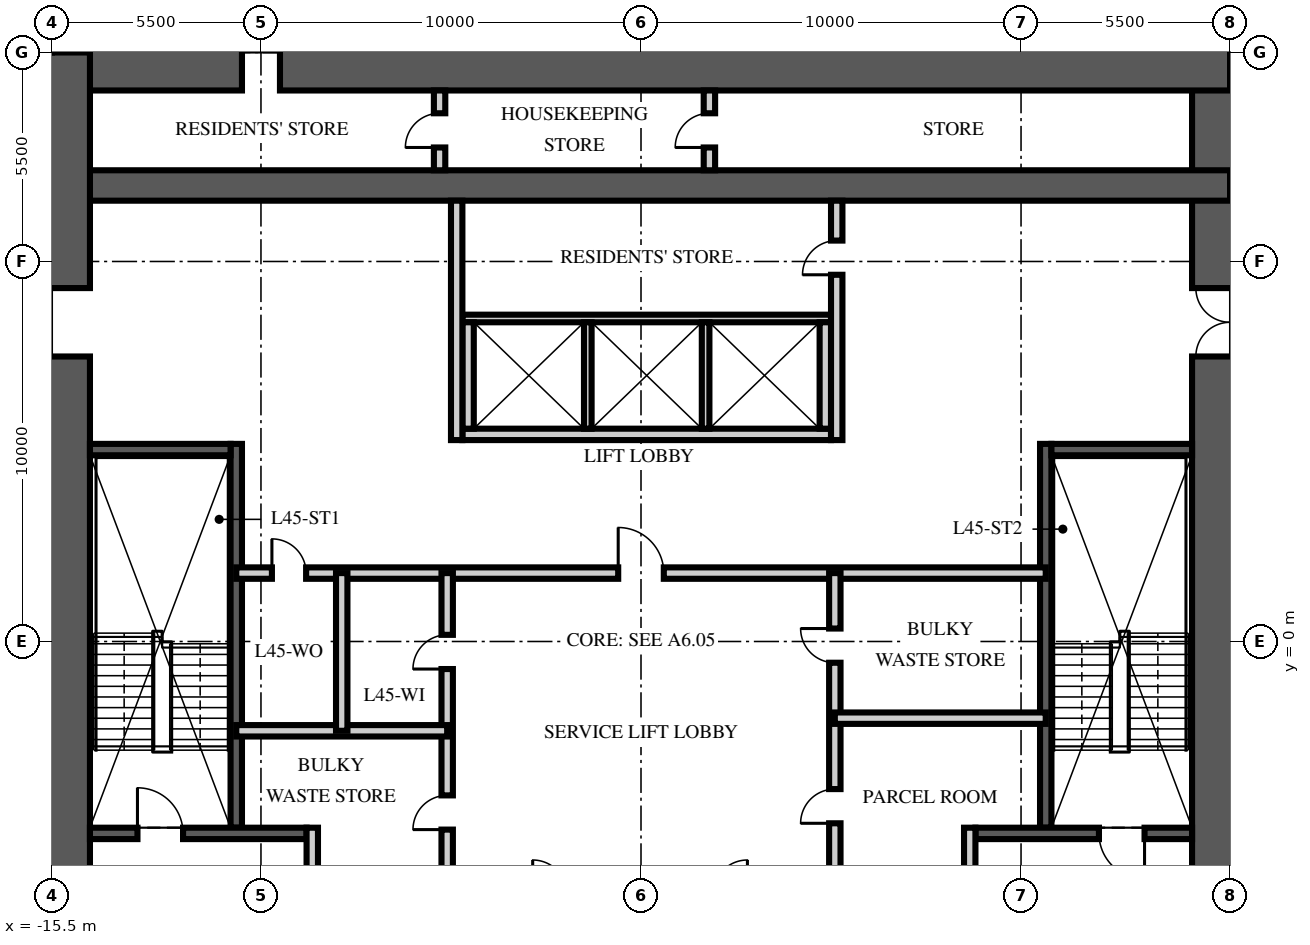
"""IFC4 building model, lengths in metres.
Left out: names, types, materials, properties, quantities, classifications, styles, units other than length and angle.
Written with IfcOpenShell. Run it as: python <this file> out.ifc"""

import sys

from ifc_helpers import new_model, si_unit, direction, frame, frame_2d, origin, place, context, subcontext, project, spatial, rectangle, extrude, element, fill, save


model = new_model("IFC4")
c1 = context("Model", 3, precision=1e-05, world=origin(), true_north=direction((0.0, 1.0)))
c2 = subcontext(c1, "Body", "Model", "MODEL_VIEW")
j1 = project(units=[si_unit("LENGTHUNIT", "METRE"), si_unit("PLANEANGLEUNIT", "RADIAN")], contexts=[c1])
p1 = place(None, origin())
s1 = spatial("IfcSite", under=j1, at=p1, CompositionType="ELEMENT")
p2 = place(p1, origin())
s2 = spatial("IfcBuilding", under=s1, at=p2, CompositionType="ELEMENT")
p3 = place(p2, frame((0.0, 0.0, 178.5)))
s3 = spatial("IfcBuildingStorey", under=s2, at=p3, CompositionType="ELEMENT", Elevation=178.5)
p4 = place(p3, frame((15.5, -15.5, -0.25), z_axis=(0.0, 0.0, 1.0), x_axis=(0.0, 1.0, 0.0)))
e1 = element("IfcWall", 1, at=p4, inside=s3, PredefinedType="SHEAR", context=c2, shape_type="SweptSolid", body=[
    extrude(rectangle(XDim=31.0, YDim=2.0, at=frame_2d((15.5, 0.0))), origin(), (0.0, 0.0, 1.0), 3.75),
])
p5 = place(p4, frame((6.5, 0.0, 0.25)))
e2 = element("IfcOpeningElement", 2, at=p5, cuts=e1, PredefinedType="OPENING", context=c2, shape_type="SweptSolid", body=[
    extrude(rectangle(XDim=1.2, YDim=2.1, at=frame_2d((0.6, 1.05))), frame((0.0, 1.01, 0.0), z_axis=(0.0, -1.0, 0.0), x_axis=(1.0, 0.0, 0.0)), (0.0, 0.0, 1.0), 2.02),
])
p6 = place(p4, frame((23.0, 0.0, 0.25)))
e3 = element("IfcOpeningElement", 3, at=p6, cuts=e1, PredefinedType="OPENING", context=c2, shape_type="SweptSolid", body=[
    extrude(rectangle(XDim=1.8, YDim=2.1, at=frame_2d((0.9, 1.05))), frame((0.0, 1.01, 0.0), z_axis=(0.0, -1.0, 0.0), x_axis=(1.0, 0.0, 0.0)), (0.0, 0.0, 1.0), 2.02),
])
p7 = place(p3, frame((-15.5, 15.5, -0.25), z_axis=(0.0, 0.0, 1.0), x_axis=(1.0, 0.0, 0.0)))
e4 = element("IfcWall", 4, at=p7, inside=s3, PredefinedType="SHEAR", context=c2, shape_type="SweptSolid", body=[
    extrude(rectangle(XDim=31.0, YDim=2.0, at=frame_2d((15.5, 0.0))), origin(), (0.0, 0.0, 1.0), 3.75),
])
p8 = place(p7, frame((5.0, 0.0, 0.25)))
e5 = element("IfcOpeningElement", 5, at=p8, cuts=e4, PredefinedType="OPENING", context=c2, shape_type="SweptSolid", body=[
    extrude(rectangle(XDim=1.0, YDim=2.1, at=frame_2d((0.5, 1.05))), frame((0.0, 1.01, 0.0), z_axis=(0.0, -1.0, 0.0), x_axis=(1.0, 0.0, 0.0)), (0.0, 0.0, 1.0), 2.02),
])
p9 = place(p3, frame((-15.5, 12.0, -0.25), z_axis=(0.0, 0.0, 1.0), x_axis=(1.0, 0.0, 0.0)))
e6 = element("IfcWall", 6, at=p9, inside=s3, PredefinedType="SHEAR", context=c2, shape_type="SweptSolid", body=[
    extrude(rectangle(XDim=31.0, YDim=0.8, at=frame_2d((15.5, 0.0))), origin(), (0.0, 0.0, 1.0), 3.75),
])
p10 = place(p3, frame((-15.5, -15.5, -0.25), z_axis=(0.0, 0.0, 1.0), x_axis=(0.0, 1.0, 0.0)))
e7 = element("IfcWall", 7, at=p10, inside=s3, PredefinedType="SHEAR", context=c2, shape_type="SweptSolid", body=[
    extrude(rectangle(XDim=31.0, YDim=2.0, at=frame_2d((15.5, 0.0))), origin(), (0.0, 0.0, 1.0), 3.75),
])
p11 = place(p10, frame((6.5, 0.0, 0.25)))
e8 = element("IfcOpeningElement", 8, at=p11, cuts=e7, PredefinedType="OPENING", context=c2, shape_type="SweptSolid", body=[
    extrude(rectangle(XDim=1.2, YDim=2.1, at=frame_2d((0.6, 1.05))), frame((0.0, 1.01, 0.0), z_axis=(0.0, -1.0, 0.0), x_axis=(1.0, 0.0, 0.0)), (0.0, 0.0, 1.0), 2.02),
])
p12 = place(p10, frame((23.0, 0.0, 0.25)))
e9 = element("IfcOpeningElement", 9, at=p12, cuts=e7, PredefinedType="OPENING", context=c2, shape_type="SweptSolid", body=[
    extrude(rectangle(XDim=1.8, YDim=2.1, at=frame_2d((0.9, 1.05))), frame((0.0, 1.01, 0.0), z_axis=(0.0, -1.0, 0.0), x_axis=(1.0, 0.0, 0.0)), (0.0, 0.0, 1.0), 2.02),
])
p13 = place(p3, frame((-10.65, -4.9, 0.0), z_axis=(0.0, 0.0, 1.0), x_axis=(0.0, 1.0, 0.0)))
e10 = element("IfcWall", 10, at=p13, inside=s3, PredefinedType="SOLIDWALL", context=c2, shape_type="SweptSolid", body=[
    extrude(rectangle(XDim=10.1, YDim=0.3, at=frame_2d((5.05, 0.0))), origin(), (0.0, 0.0, 1.0), 3.5),
])
p14 = place(p3, frame((-14.5, -5.05, 0.0), z_axis=(0.0, 0.0, 1.0), x_axis=(1.0, 0.0, 0.0)))
e11 = element("IfcWall", 11, at=p14, inside=s3, PredefinedType="SOLIDWALL", context=c2, shape_type="SweptSolid", body=[
    extrude(rectangle(XDim=5.7, YDim=0.3, at=frame_2d((2.85, 0.0))), origin(), (0.0, 0.0, 1.0), 3.5),
])
p15 = place(p14, frame((1.25, 0.0, 0.0)))
e12 = element("IfcOpeningElement", 12, at=p15, cuts=e11, PredefinedType="OPENING", context=c2, shape_type="SweptSolid", body=[
    extrude(rectangle(XDim=1.2, YDim=2.1, at=frame_2d((0.6, 1.05))), frame((0.0, 0.16, 0.0), z_axis=(0.0, -1.0, 0.0), x_axis=(1.0, 0.0, 0.0)), (0.0, 0.0, 1.0), 0.32),
])
p16 = place(p3, frame((-14.5, 5.05, 0.0), z_axis=(0.0, 0.0, 1.0), x_axis=(1.0, 0.0, 0.0)))
e13 = element("IfcWall", 13, at=p16, inside=s3, PredefinedType="SOLIDWALL", context=c2, shape_type="SweptSolid", body=[
    extrude(rectangle(XDim=3.7, YDim=0.3, at=frame_2d((1.85, 0.0))), origin(), (0.0, 0.0, 1.0), 3.5),
])
p17 = place(p3, frame((-8.65, -11.6, 0.0), z_axis=(0.0, 0.0, 1.0), x_axis=(0.0, 1.0, 0.0)))
e14 = element("IfcWall", 14, at=p17, inside=s3, PredefinedType="PARTITIONING", context=c2, shape_type="SweptSolid", body=[
    extrude(rectangle(XDim=6.7, YDim=0.3, at=frame_2d((3.35, 0.0))), origin(), (0.0, 0.0, 1.0), 3.5),
])
p18 = place(p17, frame((2.85, 0.0, 0.0)))
e15 = element("IfcOpeningElement", 15, at=p18, cuts=e14, PredefinedType="OPENING", context=c2, shape_type="SweptSolid", body=[
    extrude(rectangle(XDim=1.1, YDim=2.1, at=frame_2d((0.55, 1.05))), frame((0.0, 0.16, 0.0), z_axis=(0.0, -1.0, 0.0), x_axis=(1.0, 0.0, 0.0)), (0.0, 0.0, 1.0), 0.32),
])
p19 = place(p3, frame((10.65, -4.9, 0.0), z_axis=(0.0, 0.0, 1.0), x_axis=(0.0, 1.0, 0.0)))
e16 = element("IfcWall", 16, at=p19, inside=s3, PredefinedType="SOLIDWALL", context=c2, shape_type="SweptSolid", body=[
    extrude(rectangle(XDim=10.1, YDim=0.3, at=frame_2d((5.05, 0.0))), origin(), (0.0, 0.0, 1.0), 3.5),
])
p20 = place(p3, frame((14.5, -5.05, 0.0), z_axis=(0.0, 0.0, 1.0), x_axis=(-1.0, 0.0, 0.0)))
e17 = element("IfcWall", 17, at=p20, inside=s3, PredefinedType="SOLIDWALL", context=c2, shape_type="SweptSolid", body=[
    extrude(rectangle(XDim=5.7, YDim=0.3, at=frame_2d((2.85, 0.0))), origin(), (0.0, 0.0, 1.0), 3.5),
])
p21 = place(p20, frame((1.25, 0.0, 0.0)))
e18 = element("IfcOpeningElement", 18, at=p21, cuts=e17, PredefinedType="OPENING", context=c2, shape_type="SweptSolid", body=[
    extrude(rectangle(XDim=1.2, YDim=2.1, at=frame_2d((0.6, 1.05))), frame((0.0, 0.16, 0.0), z_axis=(0.0, -1.0, 0.0), x_axis=(1.0, 0.0, 0.0)), (0.0, 0.0, 1.0), 0.32),
])
p22 = place(p3, frame((14.5, 5.05, 0.0), z_axis=(0.0, 0.0, 1.0), x_axis=(-1.0, 0.0, 0.0)))
e19 = element("IfcWall", 19, at=p22, inside=s3, PredefinedType="SOLIDWALL", context=c2, shape_type="SweptSolid", body=[
    extrude(rectangle(XDim=3.7, YDim=0.3, at=frame_2d((1.85, 0.0))), origin(), (0.0, 0.0, 1.0), 3.5),
])
p23 = place(p3, frame((8.65, -11.6, 0.0), z_axis=(0.0, 0.0, 1.0), x_axis=(0.0, 1.0, 0.0)))
e20 = element("IfcWall", 20, at=p23, inside=s3, PredefinedType="PARTITIONING", context=c2, shape_type="SweptSolid", body=[
    extrude(rectangle(XDim=6.7, YDim=0.3, at=frame_2d((3.35, 0.0))), origin(), (0.0, 0.0, 1.0), 3.5),
])
p24 = place(p23, frame((2.85, 0.0, 0.0)))
e21 = element("IfcOpeningElement", 21, at=p24, cuts=e20, PredefinedType="OPENING", context=c2, shape_type="SweptSolid", body=[
    extrude(rectangle(XDim=1.1, YDim=2.1, at=frame_2d((0.55, 1.05))), frame((0.0, 0.16, 0.0), z_axis=(0.0, -1.0, 0.0), x_axis=(1.0, 0.0, 0.0)), (0.0, 0.0, 1.0), 0.32),
])
p25 = place(p3, frame((-4.7, 5.45, 0.0), z_axis=(0.0, 0.0, 1.0), x_axis=(1.0, 0.0, 0.0)))
e22 = element("IfcWall", 22, at=p25, inside=s3, PredefinedType="PARTITIONING", context=c2, shape_type="SweptSolid", body=[
    extrude(rectangle(XDim=9.7, YDim=0.3, at=frame_2d((4.85, 0.0))), origin(), (0.0, 0.0, 1.0), 3.5),
])
p26 = place(p3, frame((-4.7, 8.5, 0.0), z_axis=(0.0, 0.0, 1.0), x_axis=(1.0, 0.0, 0.0)))
e23 = element("IfcWall", 23, at=p26, inside=s3, PredefinedType="PARTITIONING", context=c2, shape_type="SweptSolid", body=[
    extrude(rectangle(XDim=9.7, YDim=0.2, at=frame_2d((4.85, 0.0))), origin(), (0.0, 0.0, 1.0), 3.5),
])
for number, where, z_axis, x_axis in (
    (24, (-4.55, 5.6, 0.0), (0.0, 0.0, 1.0), (0.0, 1.0, 0.0)),
    (25, (4.85, 5.6, 0.0), (0.0, 0.0, 1.0), (0.0, 1.0, 0.0)),
):
    element("IfcWall", number, at=place(p3, frame(where, z_axis=z_axis, x_axis=x_axis)), inside=s3, PredefinedType="PARTITIONING", context=c2, shape_type="SweptSolid", body=[
        extrude(rectangle(XDim=2.8, YDim=0.3, at=frame_2d((1.4, 0.0))), origin(), (0.0, 0.0, 1.0), 3.5),
    ])
for number, where, z_axis, x_axis in (
    (26, (-1.4, 5.6, 0.0), (0.0, 0.0, 1.0), (0.0, 1.0, 0.0)),
    (27, (1.7, 5.6, 0.0), (0.0, 0.0, 1.0), (0.0, 1.0, 0.0)),
):
    element("IfcWall", number, at=place(p3, frame(where, z_axis=z_axis, x_axis=x_axis)), inside=s3, PredefinedType="PARTITIONING", context=c2, shape_type="SweptSolid", body=[
        extrude(rectangle(XDim=2.8, YDim=0.2, at=frame_2d((1.4, 0.0))), origin(), (0.0, 0.0, 1.0), 3.5),
    ])
p27 = place(p3, frame((-10.65, 1.8, 0.0), z_axis=(0.0, 0.0, 1.0), x_axis=(1.0, 0.0, 0.0)))
e28 = element("IfcWall", 28, at=p27, inside=s3, PredefinedType="PARTITIONING", context=c2, shape_type="SweptSolid", body=[
    extrude(rectangle(XDim=21.3, YDim=0.3, at=frame_2d((10.65, 0.0))), origin(), (0.0, 0.0, 1.0), 3.5),
])
p28 = place(p27, frame((10.05, 0.0, 0.0)))
e29 = element("IfcOpeningElement", 29, at=p28, cuts=e28, PredefinedType="OPENING", context=c2, shape_type="SweptSolid", body=[
    extrude(rectangle(XDim=1.2, YDim=2.1, at=frame_2d((0.6, 1.05))), frame((0.0, 0.16, 0.0), z_axis=(0.0, -1.0, 0.0), x_axis=(1.0, 0.0, 0.0)), (0.0, 0.0, 1.0), 0.32),
])
p29 = place(p27, frame((0.938, 0.0, 0.0)))
e30 = element("IfcOpeningElement", 30, at=p29, cuts=e28, PredefinedType="OPENING", context=c2, shape_type="SweptSolid", body=[
    extrude(rectangle(XDim=0.9, YDim=2.1, at=frame_2d((0.45, 1.05))), frame((0.0, 0.16, 0.0), z_axis=(0.0, -1.0, 0.0), x_axis=(1.0, 0.0, 0.0)), (0.0, 0.0, 1.0), 0.32),
])
p30 = place(p3, frame((-5.1, -6.65, 0.0), z_axis=(0.0, 0.0, 1.0), x_axis=(0.0, 1.0, 0.0)))
e31 = element("IfcWall", 31, at=p30, inside=s3, PredefinedType="PARTITIONING", context=c2, shape_type="SweptSolid", body=[
    extrude(rectangle(XDim=8.45, YDim=0.3, at=frame_2d((4.225, 0.0))), origin(), (0.0, 0.0, 1.0), 3.5),
])
p31 = place(p30, frame((1.7, 0.0, 0.0)))
e32 = element("IfcOpeningElement", 32, at=p31, cuts=e31, PredefinedType="OPENING", context=c2, shape_type="SweptSolid", body=[
    extrude(rectangle(XDim=0.9, YDim=2.1, at=frame_2d((0.45, 1.05))), frame((0.0, 0.16, 0.0), z_axis=(0.0, -1.0, 0.0), x_axis=(1.0, 0.0, 0.0)), (0.0, 0.0, 1.0), 0.32),
])
p32 = place(p30, frame((5.925, 0.0, 0.0)))
e33 = element("IfcOpeningElement", 33, at=p32, cuts=e31, PredefinedType="OPENING", context=c2, shape_type="SweptSolid", body=[
    extrude(rectangle(XDim=0.9, YDim=2.1, at=frame_2d((0.45, 1.05))), frame((0.0, 0.16, 0.0), z_axis=(0.0, -1.0, 0.0), x_axis=(1.0, 0.0, 0.0)), (0.0, 0.0, 1.0), 0.32),
])
p33 = place(p3, frame((5.1, -6.65, 0.0), z_axis=(0.0, 0.0, 1.0), x_axis=(0.0, 1.0, 0.0)))
e34 = element("IfcWall", 34, at=p33, inside=s3, PredefinedType="PARTITIONING", context=c2, shape_type="SweptSolid", body=[
    extrude(rectangle(XDim=8.45, YDim=0.3, at=frame_2d((4.225, 0.0))), origin(), (0.0, 0.0, 1.0), 3.5),
])
p34 = place(p33, frame((1.866, 0.0, 0.0)))
e35 = element("IfcOpeningElement", 35, at=p34, cuts=e34, PredefinedType="OPENING", context=c2, shape_type="SweptSolid", body=[
    extrude(rectangle(XDim=0.9, YDim=2.1, at=frame_2d((0.45, 1.05))), frame((0.0, 0.16, 0.0), z_axis=(0.0, -1.0, 0.0), x_axis=(1.0, 0.0, 0.0)), (0.0, 0.0, 1.0), 0.32),
])
p35 = place(p33, frame((6.091, 0.0, 0.0)))
e36 = element("IfcOpeningElement", 36, at=p35, cuts=e34, PredefinedType="OPENING", context=c2, shape_type="SweptSolid", body=[
    extrude(rectangle(XDim=0.9, YDim=2.1, at=frame_2d((0.45, 1.05))), frame((0.0, 0.16, 0.0), z_axis=(0.0, -1.0, 0.0), x_axis=(1.0, 0.0, 0.0)), (0.0, 0.0, 1.0), 0.32),
])
p36 = place(p3, frame((-10.65, -2.35, 0.0), z_axis=(0.0, 0.0, 1.0), x_axis=(1.0, 0.0, 0.0)))
e37 = element("IfcWall", 37, at=p36, inside=s3, PredefinedType="PARTITIONING", context=c2, shape_type="SweptSolid", body=[
    extrude(rectangle(XDim=5.55, YDim=0.3, at=frame_2d((2.775, 0.0))), origin(), (0.0, 0.0, 1.0), 3.5),
])
p37 = place(p3, frame((-7.875, -2.35, 0.0), z_axis=(0.0, 0.0, 1.0), x_axis=(0.0, 1.0, 0.0)))
e38 = element("IfcWall", 38, at=p37, inside=s3, PredefinedType="PARTITIONING", context=c2, shape_type="SweptSolid", body=[
    extrude(rectangle(XDim=4.15, YDim=0.3, at=frame_2d((2.075, 0.0))), origin(), (0.0, 0.0, 1.0), 3.5),
])
p38 = place(p3, frame((10.65, -2.018, 0.0), z_axis=(0.0, 0.0, 1.0), x_axis=(-1.0, 0.0, 0.0)))
e39 = element("IfcWall", 39, at=p38, inside=s3, PredefinedType="PARTITIONING", context=c2, shape_type="SweptSolid", body=[
    extrude(rectangle(XDim=5.55, YDim=0.3, at=frame_2d((2.775, 0.0))), origin(), (0.0, 0.0, 1.0), 3.5),
])
p39 = place(p3, frame((-4.85, 5.3, 0.0), z_axis=(0.0, 0.0, 1.0), x_axis=(0.0, 1.0, 0.0)))
e40 = element("IfcWall", 40, at=p39, inside=s3, PredefinedType="PARTITIONING", context=c2, shape_type="SweptSolid", body=[
    extrude(rectangle(XDim=6.3, YDim=0.3, at=frame_2d((3.15, 0.0))), origin(), (0.0, 0.0, 1.0), 3.5),
])
p40 = place(p3, frame((5.15, 5.3, 0.0), z_axis=(0.0, 0.0, 1.0), x_axis=(0.0, 1.0, 0.0)))
e41 = element("IfcWall", 41, at=p40, inside=s3, PredefinedType="PARTITIONING", context=c2, shape_type="SweptSolid", body=[
    extrude(rectangle(XDim=6.3, YDim=0.3, at=frame_2d((3.15, 0.0))), origin(), (0.0, 0.0, 1.0), 3.5),
])
p41 = place(p40, frame((4.35, 0.0, 0.0)))
e42 = element("IfcOpeningElement", 42, at=p41, cuts=e41, PredefinedType="OPENING", context=c2, shape_type="SweptSolid", body=[
    extrude(rectangle(XDim=0.9, YDim=2.1, at=frame_2d((0.45, 1.05))), frame((0.0, 0.16, 0.0), z_axis=(0.0, -1.0, 0.0), x_axis=(1.0, 0.0, 0.0)), (0.0, 0.0, 1.0), 0.32),
])
p42 = place(p3, frame((-5.3, 12.4, 0.0), z_axis=(0.0, 0.0, 1.0), x_axis=(0.0, 1.0, 0.0)))
e43 = element("IfcWall", 43, at=p42, inside=s3, PredefinedType="PARTITIONING", context=c2, shape_type="SweptSolid", body=[
    extrude(rectangle(XDim=2.1, YDim=0.3, at=frame_2d((1.05, 0.0))), origin(), (0.0, 0.0, 1.0), 3.5),
])
p43 = place(p42, frame((0.6, 0.0, 0.0)))
e44 = element("IfcOpeningElement", 44, at=p43, cuts=e43, PredefinedType="OPENING", context=c2, shape_type="SweptSolid", body=[
    extrude(rectangle(XDim=0.9, YDim=2.1, at=frame_2d((0.45, 1.05))), frame((0.0, 0.16, 0.0), z_axis=(0.0, -1.0, 0.0), x_axis=(1.0, 0.0, 0.0)), (0.0, 0.0, 1.0), 0.32),
])
p44 = place(p3, frame((1.8, 12.4, 0.0), z_axis=(0.0, 0.0, 1.0), x_axis=(0.0, 1.0, 0.0)))
e45 = element("IfcWall", 45, at=p44, inside=s3, PredefinedType="PARTITIONING", context=c2, shape_type="SweptSolid", body=[
    extrude(rectangle(XDim=2.1, YDim=0.3, at=frame_2d((1.05, 0.0))), origin(), (0.0, 0.0, 1.0), 3.5),
])
p45 = place(p44, frame((0.6, 0.0, 0.0)))
e46 = element("IfcOpeningElement", 46, at=p45, cuts=e45, PredefinedType="OPENING", context=c2, shape_type="SweptSolid", body=[
    extrude(rectangle(XDim=0.9, YDim=2.1, at=frame_2d((0.45, 1.05))), frame((0.0, 0.16, 0.0), z_axis=(0.0, -1.0, 0.0), x_axis=(1.0, 0.0, 0.0)), (0.0, 0.0, 1.0), 0.32),
])
p46 = place(p15, origin())
e47 = element("IfcDoor", 47, at=p46, inside=s3, OperationType="SINGLE_SWING_LEFT", PredefinedType="DOOR", context=c2, shape_type="SweptSolid", body=[
    extrude(rectangle(XDim=1.2, YDim=2.1, at=frame_2d((0.6, 1.05))), frame((0.0, 0.025, 0.0), z_axis=(0.0, -1.0, 0.0), x_axis=(1.0, 0.0, 0.0)), (0.0, 0.0, 1.0), 0.05),
])
fill(e12, e47)
p47 = place(p12, origin())
e48 = element("IfcDoor", 48, at=p47, inside=s3, OperationType="DOUBLE_DOOR_SINGLE_SWING", PredefinedType="DOOR", context=c2, shape_type="SweptSolid", body=[
    extrude(rectangle(XDim=1.8, YDim=2.1, at=frame_2d((0.9, 1.05))), frame((0.0, 0.025, 0.0), z_axis=(0.0, -1.0, 0.0), x_axis=(1.0, 0.0, 0.0)), (0.0, 0.0, 1.0), 0.05),
])
fill(e9, e48)
p48 = place(p21, origin())
e49 = element("IfcDoor", 49, at=p48, inside=s3, OperationType="SINGLE_SWING_LEFT", PredefinedType="DOOR", context=c2, shape_type="SweptSolid", body=[
    extrude(rectangle(XDim=1.2, YDim=2.1, at=frame_2d((0.6, 1.05))), frame((0.0, 0.025, 0.0), z_axis=(0.0, -1.0, 0.0), x_axis=(1.0, 0.0, 0.0)), (0.0, 0.0, 1.0), 0.05),
])
fill(e18, e49)
p49 = place(p6, origin())
e50 = element("IfcDoor", 50, at=p49, inside=s3, OperationType="DOUBLE_DOOR_SINGLE_SWING", PredefinedType="DOOR", context=c2, shape_type="SweptSolid", body=[
    extrude(rectangle(XDim=1.8, YDim=2.1, at=frame_2d((0.9, 1.05))), frame((0.0, 0.025, 0.0), z_axis=(0.0, -1.0, 0.0), x_axis=(1.0, 0.0, 0.0)), (0.0, 0.0, 1.0), 0.05),
])
fill(e3, e50)
p50 = place(p28, origin())
e51 = element("IfcDoor", 51, at=p50, inside=s3, OperationType="SINGLE_SWING_LEFT", PredefinedType="DOOR", context=c2, shape_type="SweptSolid", body=[
    extrude(rectangle(XDim=1.2, YDim=2.1, at=frame_2d((0.6, 1.05))), frame((0.0, 0.025, 0.0), z_axis=(0.0, -1.0, 0.0), x_axis=(1.0, 0.0, 0.0)), (0.0, 0.0, 1.0), 0.05),
])
fill(e29, e51)
p51 = place(p31, origin())
e52 = element("IfcDoor", 52, at=p51, inside=s3, OperationType="SINGLE_SWING_LEFT", PredefinedType="DOOR", context=c2, shape_type="SweptSolid", body=[
    extrude(rectangle(XDim=0.9, YDim=2.1, at=frame_2d((0.45, 1.05))), frame((0.0, 0.025, 0.0), z_axis=(0.0, -1.0, 0.0), x_axis=(1.0, 0.0, 0.0)), (0.0, 0.0, 1.0), 0.05),
])
fill(e32, e52)
p52 = place(p32, origin())
e53 = element("IfcDoor", 53, at=p52, inside=s3, OperationType="SINGLE_SWING_LEFT", PredefinedType="DOOR", context=c2, shape_type="SweptSolid", body=[
    extrude(rectangle(XDim=0.9, YDim=2.1, at=frame_2d((0.45, 1.05))), frame((0.0, 0.025, 0.0), z_axis=(0.0, -1.0, 0.0), x_axis=(1.0, 0.0, 0.0)), (0.0, 0.0, 1.0), 0.05),
])
fill(e33, e53)
p53 = place(p29, origin())
e54 = element("IfcDoor", 54, at=p53, inside=s3, OperationType="SINGLE_SWING_LEFT", PredefinedType="DOOR", context=c2, shape_type="SweptSolid", body=[
    extrude(rectangle(XDim=0.9, YDim=2.1, at=frame_2d((0.45, 1.05))), frame((0.0, 0.025, 0.0), z_axis=(0.0, -1.0, 0.0), x_axis=(1.0, 0.0, 0.0)), (0.0, 0.0, 1.0), 0.05),
])
fill(e30, e54)
p54 = place(p34, origin())
e55 = element("IfcDoor", 55, at=p54, inside=s3, OperationType="SINGLE_SWING_LEFT", PredefinedType="DOOR", context=c2, shape_type="SweptSolid", body=[
    extrude(rectangle(XDim=0.9, YDim=2.1, at=frame_2d((0.45, 1.05))), frame((0.0, 0.025, 0.0), z_axis=(0.0, -1.0, 0.0), x_axis=(1.0, 0.0, 0.0)), (0.0, 0.0, 1.0), 0.05),
])
fill(e35, e55)
p55 = place(p35, origin())
e56 = element("IfcDoor", 56, at=p55, inside=s3, OperationType="SINGLE_SWING_RIGHT", PredefinedType="DOOR", context=c2, shape_type="SweptSolid", body=[
    extrude(rectangle(XDim=0.9, YDim=2.1, at=frame_2d((0.45, 1.05))), frame((0.0, 0.025, 0.0), z_axis=(0.0, -1.0, 0.0), x_axis=(1.0, 0.0, 0.0)), (0.0, 0.0, 1.0), 0.05),
])
fill(e36, e56)
p56 = place(p41, origin())
e57 = element("IfcDoor", 57, at=p56, inside=s3, OperationType="SINGLE_SWING_LEFT", PredefinedType="DOOR", context=c2, shape_type="SweptSolid", body=[
    extrude(rectangle(XDim=0.9, YDim=2.1, at=frame_2d((0.45, 1.05))), frame((0.0, 0.025, 0.0), z_axis=(0.0, -1.0, 0.0), x_axis=(1.0, 0.0, 0.0)), (0.0, 0.0, 1.0), 0.05),
])
fill(e42, e57)
p57 = place(p43, origin())
e58 = element("IfcDoor", 58, at=p57, inside=s3, OperationType="SINGLE_SWING_LEFT", PredefinedType="DOOR", context=c2, shape_type="SweptSolid", body=[
    extrude(rectangle(XDim=0.9, YDim=2.1, at=frame_2d((0.45, 1.05))), frame((0.0, 0.025, 0.0), z_axis=(0.0, -1.0, 0.0), x_axis=(1.0, 0.0, 0.0)), (0.0, 0.0, 1.0), 0.05),
])
fill(e44, e58)
p58 = place(p45, origin())
e59 = element("IfcDoor", 59, at=p58, inside=s3, OperationType="SINGLE_SWING_LEFT", PredefinedType="DOOR", context=c2, shape_type="SweptSolid", body=[
    extrude(rectangle(XDim=0.9, YDim=2.1, at=frame_2d((0.45, 1.05))), frame((0.0, 0.025, 0.0), z_axis=(0.0, -1.0, 0.0), x_axis=(1.0, 0.0, 0.0)), (0.0, 0.0, 1.0), 0.05),
])
fill(e46, e59)
p59 = place(p8, origin())
e60 = element("IfcDoor", 60, at=p59, inside=s3, OperationType="SINGLE_SWING_RIGHT", PredefinedType="DOOR", context=c2, shape_type="SweptSolid", body=[
    extrude(rectangle(XDim=1.0, YDim=2.1, at=frame_2d((0.5, 1.05))), frame((0.0, 0.025, 0.0), z_axis=(0.0, -1.0, 0.0), x_axis=(1.0, 0.0, 0.0)), (0.0, 0.0, 1.0), 0.05),
])
fill(e5, e60)
save(model, sys.argv[1])
